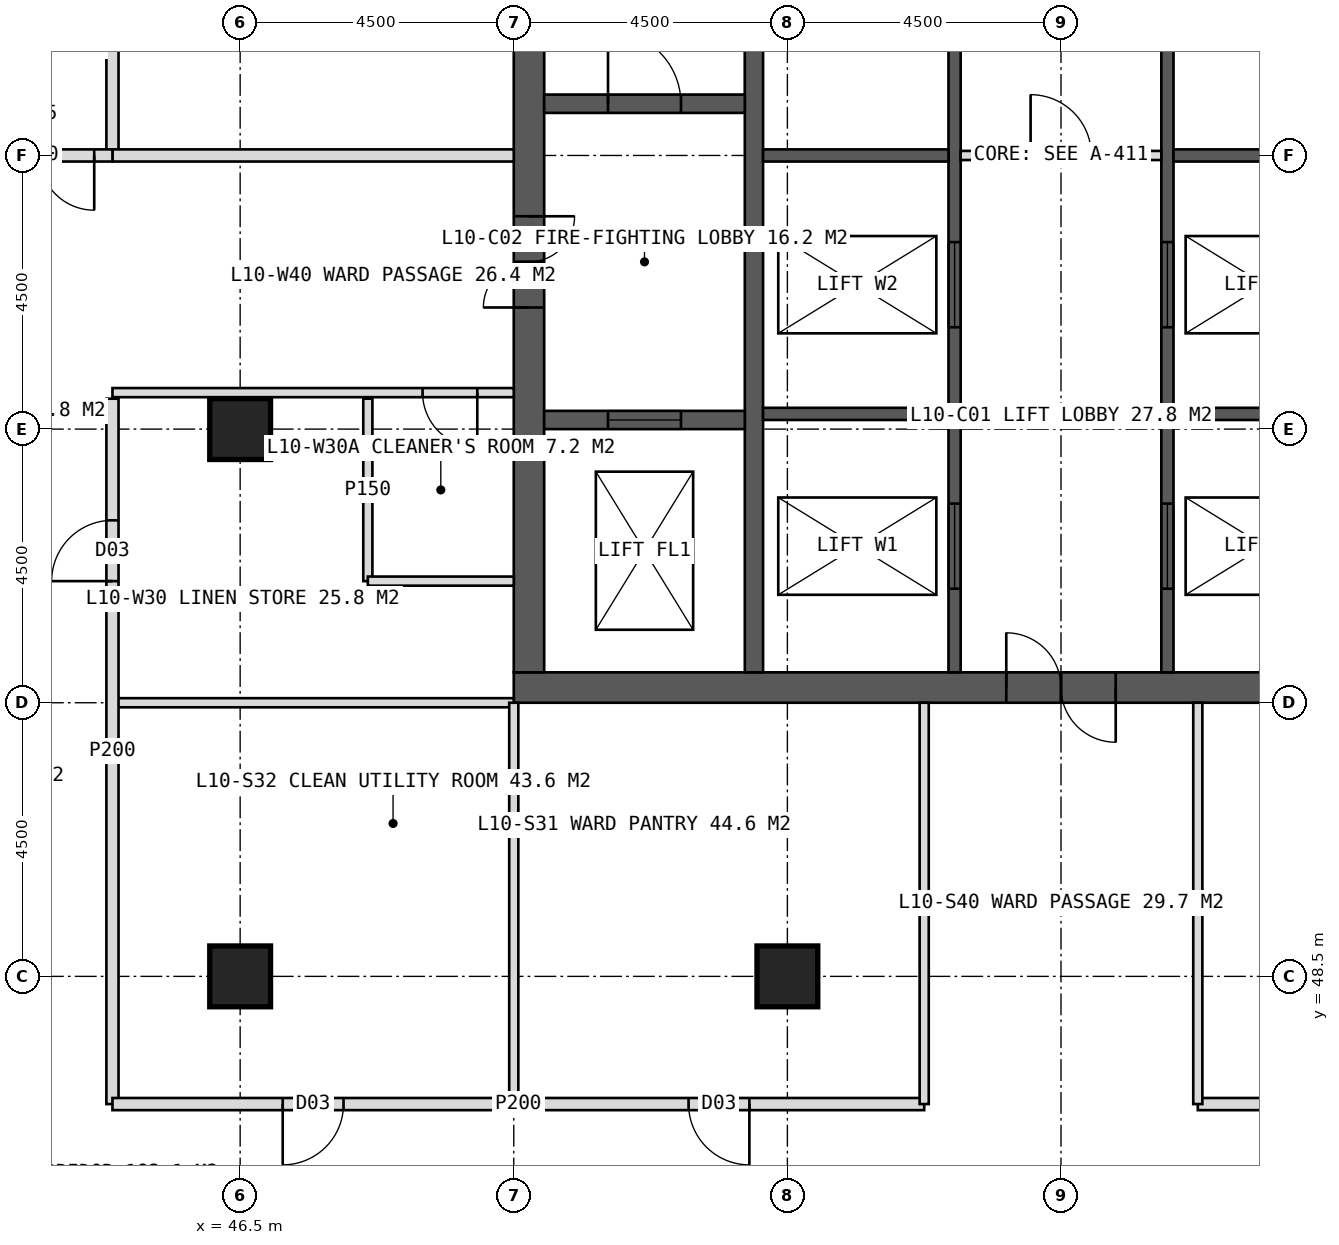
"""IFC4 building model, lengths in metres.
Left out: names, types, materials, properties, quantities, classifications, styles, units other than length and angle.
Written with IfcOpenShell. Run it as: python <this file> out.ifc"""

import sys

from ifc_helpers import new_model, si_unit, direction, frame, frame_2d, origin, origin_2d, place, context, subcontext, project, spatial, rectangle, hollow_rectangle, extrude, element, fill, save


model = new_model("IFC4")
c1 = context("Model", 3, precision=1e-05, world=origin(), true_north=direction((0.0, 1.0)))
c2 = subcontext(c1, "Body", "Model", "MODEL_VIEW")
j1 = project(units=[si_unit("LENGTHUNIT", "METRE"), si_unit("PLANEANGLEUNIT", "RADIAN")], contexts=[c1])
p1 = place(None, origin())
s1 = spatial("IfcSite", under=j1, at=p1, CompositionType="ELEMENT")
p2 = place(p1, origin())
s2 = spatial("IfcBuilding", under=s1, at=p2, CompositionType="ELEMENT")
p3 = place(p2, frame((0.0, 0.0, 47.0)))
s3 = spatial("IfcBuildingStorey", under=s2, at=p3, CompositionType="ELEMENT", Elevation=47.0)
p4 = place(p3, frame((51.0, 53.25, 0.0), z_axis=(0.0, 0.0, 1.0), x_axis=(1.0, 0.0, 0.0)))
e1 = element("IfcWall", 1, at=p4, inside=s3, PredefinedType="SHEAR", context=c2, shape_type="SweptSolid", body=[
    extrude(rectangle(XDim=18.0, YDim=0.5, at=frame_2d((9.0, 0.0))), origin(), (0.0, 0.0, 1.0), 4.0),
])
p5 = place(p4, frame((8.1, 0.0, 0.0)))
e2 = element("IfcOpeningElement", 2, at=p5, cuts=e1, PredefinedType="OPENING", context=c2, shape_type="SweptSolid", body=[
    extrude(rectangle(XDim=1.8, YDim=2.2, at=frame_2d((0.9, 1.1))), frame((0.0, 0.26, 0.0), z_axis=(0.0, -1.0, 0.0), x_axis=(1.0, 0.0, 0.0)), (0.0, 0.0, 1.0), 0.52),
])
p6 = place(p3, frame((51.25, 53.5, 0.0), z_axis=(0.0, 0.0, 1.0), x_axis=(0.0, 1.0, 0.0)))
e3 = element("IfcWall", 3, at=p6, inside=s3, PredefinedType="SHEAR", context=c2, shape_type="SweptSolid", body=[
    extrude(rectangle(XDim=17.0, YDim=0.5, at=frame_2d((8.5, 0.0))), origin(), (0.0, 0.0, 1.0), 4.0),
])
p7 = place(p6, frame((6.0, 0.0, 0.0)))
e4 = element("IfcOpeningElement", 4, at=p7, cuts=e3, PredefinedType="OPENING", context=c2, shape_type="SweptSolid", body=[
    extrude(rectangle(XDim=1.5, YDim=2.2, at=frame_2d((0.75, 1.1))), frame((0.0, 0.26, 0.0), z_axis=(0.0, -1.0, 0.0), x_axis=(1.0, 0.0, 0.0)), (0.0, 0.0, 1.0), 0.52),
])
p8 = place(p3, frame((54.95, 53.5, 0.0), z_axis=(0.0, 0.0, 1.0), x_axis=(0.0, 1.0, 0.0)))
e5 = element("IfcWall", 5, at=p8, inside=s3, PredefinedType="SHEAR", context=c2, shape_type="SweptSolid", body=[
    extrude(rectangle(XDim=17.0, YDim=0.3, at=frame_2d((8.5, 0.0))), origin(), (0.0, 0.0, 1.0), 4.0),
])
p9 = place(p3, frame((58.25, 53.5, 0.0), z_axis=(0.0, 0.0, 1.0), x_axis=(0.0, 1.0, 0.0)))
e6 = element("IfcWall", 6, at=p9, inside=s3, PredefinedType="SHEAR", context=c2, shape_type="SweptSolid", body=[
    extrude(rectangle(XDim=17.0, YDim=0.2, at=frame_2d((8.5, 0.0))), origin(), (0.0, 0.0, 1.0), 4.0),
])
p10 = place(p9, frame((1.375, 0.0, 0.0)))
e7 = element("IfcOpeningElement", 7, at=p10, cuts=e6, PredefinedType="OPENING", context=c2, shape_type="SweptSolid", body=[
    extrude(rectangle(XDim=1.4, YDim=2.2, at=frame_2d((0.7, 1.1))), frame((0.0, 0.11, 0.0), z_axis=(0.0, -1.0, 0.0), x_axis=(1.0, 0.0, 0.0)), (0.0, 0.0, 1.0), 0.22),
])
p11 = place(p9, frame((5.675, 0.0, 0.0)))
e8 = element("IfcOpeningElement", 8, at=p11, cuts=e6, PredefinedType="OPENING", context=c2, shape_type="SweptSolid", body=[
    extrude(rectangle(XDim=1.4, YDim=2.2, at=frame_2d((0.7, 1.1))), frame((0.0, 0.11, 0.0), z_axis=(0.0, -1.0, 0.0), x_axis=(1.0, 0.0, 0.0)), (0.0, 0.0, 1.0), 0.22),
])
p12 = place(p3, frame((61.75, 53.5, 0.0), z_axis=(0.0, 0.0, 1.0), x_axis=(0.0, 1.0, 0.0)))
e9 = element("IfcWall", 9, at=p12, inside=s3, PredefinedType="SHEAR", context=c2, shape_type="SweptSolid", body=[
    extrude(rectangle(XDim=17.0, YDim=0.2, at=frame_2d((8.5, 0.0))), origin(), (0.0, 0.0, 1.0), 4.0),
])
p13 = place(p12, frame((1.375, 0.0, 0.0)))
e10 = element("IfcOpeningElement", 10, at=p13, cuts=e9, PredefinedType="OPENING", context=c2, shape_type="SweptSolid", body=[
    extrude(rectangle(XDim=1.4, YDim=2.2, at=frame_2d((0.7, 1.1))), frame((0.0, 0.11, 0.0), z_axis=(0.0, -1.0, 0.0), x_axis=(1.0, 0.0, 0.0)), (0.0, 0.0, 1.0), 0.22),
])
p14 = place(p12, frame((5.675, 0.0, 0.0)))
e11 = element("IfcOpeningElement", 11, at=p14, cuts=e9, PredefinedType="OPENING", context=c2, shape_type="SweptSolid", body=[
    extrude(rectangle(XDim=1.4, YDim=2.2, at=frame_2d((0.7, 1.1))), frame((0.0, 0.11, 0.0), z_axis=(0.0, -1.0, 0.0), x_axis=(1.0, 0.0, 0.0)), (0.0, 0.0, 1.0), 0.22),
])
for number, where, z_axis, x_axis in (
    (12, (55.1, 57.75, 0.0), (0.0, 0.0, 1.0), (1.0, 0.0, 0.0)),
    (13, (61.85, 57.75, 0.0), (0.0, 0.0, 1.0), (1.0, 0.0, 0.0)),
    (14, (55.1, 62.0, 0.0), (0.0, 0.0, 1.0), (1.0, 0.0, 0.0)),
    (15, (61.85, 62.0, 0.0), (0.0, 0.0, 1.0), (1.0, 0.0, 0.0)),
):
    element("IfcWall", number, at=place(p3, frame(where, z_axis=z_axis, x_axis=x_axis)), inside=s3, PredefinedType="SHEAR", context=c2, shape_type="SweptSolid", body=[
        extrude(rectangle(XDim=3.05, YDim=0.2, at=frame_2d((1.525, 0.0))), origin(), (0.0, 0.0, 1.0), 4.0),
    ])
p15 = place(p3, frame((51.5, 62.85, 0.0), z_axis=(0.0, 0.0, 1.0), x_axis=(1.0, 0.0, 0.0)))
e16 = element("IfcWall", 16, at=p15, inside=s3, PredefinedType="SHEAR", context=c2, shape_type="SweptSolid", body=[
    extrude(rectangle(XDim=3.3, YDim=0.3, at=frame_2d((1.65, 0.0))), origin(), (0.0, 0.0, 1.0), 4.0),
])
p16 = place(p15, frame((1.05, 0.0, 0.0)))
e17 = element("IfcOpeningElement", 17, at=p16, cuts=e16, PredefinedType="OPENING", context=c2, shape_type="SweptSolid", body=[
    extrude(rectangle(XDim=1.2, YDim=2.1, at=frame_2d((0.6, 1.05))), frame((0.0, 0.16, 0.0), z_axis=(0.0, -1.0, 0.0), x_axis=(1.0, 0.0, 0.0)), (0.0, 0.0, 1.0), 0.32),
])
p17 = place(p3, frame((51.5, 57.65, 0.0), z_axis=(0.0, 0.0, 1.0), x_axis=(1.0, 0.0, 0.0)))
e18 = element("IfcWall", 18, at=p17, inside=s3, PredefinedType="SHEAR", context=c2, shape_type="SweptSolid", body=[
    extrude(rectangle(XDim=3.3, YDim=0.3, at=frame_2d((1.65, 0.0))), origin(), (0.0, 0.0, 1.0), 4.0),
])
p18 = place(p17, frame((1.05, 0.0, 0.0)))
e19 = element("IfcOpeningElement", 19, at=p18, cuts=e18, PredefinedType="OPENING", context=c2, shape_type="SweptSolid", body=[
    extrude(rectangle(XDim=1.2, YDim=2.2, at=frame_2d((0.6, 1.1))), frame((0.0, 0.16, 0.0), z_axis=(0.0, -1.0, 0.0), x_axis=(1.0, 0.0, 0.0)), (0.0, 0.0, 1.0), 0.32),
])
for number, where, z_axis, x_axis in (
    (20, (46.5, 48.5, 0.0), (0.0, 0.0, 1.0), (1.0, 0.0, 0.0)),
    (21, (55.5, 48.5, 0.0), (0.0, 0.0, 1.0), (1.0, 0.0, 0.0)),
    (22, (46.5, 57.5, 0.0), (0.0, 0.0, 1.0), (1.0, 0.0, 0.0)),
):
    element("IfcColumn", number, at=place(p3, frame(where, z_axis=z_axis, x_axis=x_axis)), inside=s3, PredefinedType="COLUMN", context=c2, shape_type="SweptSolid", body=[
        extrude(hollow_rectangle(XDim=1.0, YDim=1.0, WallThickness=0.1, at=origin_2d()), origin(), (0.0, 0.0, 1.0), 4.0),
    ])
p19 = place(p3, frame((51.0, 53.0, 0.0), z_axis=(0.0, 0.0, 1.0), x_axis=(-1.0, 0.0, 0.0)))
e23 = element("IfcWall", 23, at=p19, inside=s3, PredefinedType="PARTITIONING", context=c2, shape_type="SweptSolid", body=[
    extrude(rectangle(XDim=6.6, YDim=0.15, at=frame_2d((3.3, 0.0))), origin(), (0.0, 0.0, 1.0), 3.75),
])
p20 = place(p3, frame((44.4, 46.4, 0.0), z_axis=(0.0, 0.0, 1.0), x_axis=(0.0, 1.0, 0.0)))
e24 = element("IfcWall", 24, at=p20, inside=s3, PredefinedType="PARTITIONING", context=c2, shape_type="SweptSolid", body=[
    extrude(rectangle(XDim=11.6, YDim=0.2, at=frame_2d((5.8, 0.0))), origin(), (0.0, 0.0, 1.0), 3.75),
])
p21 = place(p20, frame((8.6, 0.0, 0.0)))
e25 = element("IfcOpeningElement", 25, at=p21, cuts=e24, PredefinedType="OPENING", context=c2, shape_type="SweptSolid", body=[
    extrude(rectangle(XDim=1.0, YDim=2.1, at=frame_2d((0.5, 1.05))), frame((0.0, 0.11, 0.0), z_axis=(0.0, -1.0, 0.0), x_axis=(1.0, 0.0, 0.0)), (0.0, 0.0, 1.0), 0.22),
])
p22 = place(p3, frame((44.4, 62.0, 0.0), z_axis=(0.0, 0.0, 1.0), x_axis=(0.0, 1.0, 0.0)))
e26 = element("IfcWall", 26, at=p22, inside=s3, PredefinedType="PARTITIONING", context=c2, shape_type="SweptSolid", body=[
    extrude(rectangle(XDim=15.6, YDim=0.2, at=frame_2d((7.8, 0.0))), origin(), (0.0, 0.0, 1.0), 3.75),
])
p23 = place(p22, frame((4.0, 0.0, 0.0)))
e27 = element("IfcOpeningElement", 27, at=p23, cuts=e26, PredefinedType="OPENING", context=c2, shape_type="SweptSolid", body=[
    extrude(rectangle(XDim=1.0, YDim=2.1, at=frame_2d((0.5, 1.05))), frame((0.0, 0.11, 0.0), z_axis=(0.0, -1.0, 0.0), x_axis=(1.0, 0.0, 0.0)), (0.0, 0.0, 1.0), 0.22),
])
p24 = place(p22, frame((11.8, 0.0, 0.0)))
e28 = element("IfcOpeningElement", 28, at=p24, cuts=e26, PredefinedType="OPENING", context=c2, shape_type="SweptSolid", body=[
    extrude(rectangle(XDim=1.0, YDim=2.1, at=frame_2d((0.5, 1.05))), frame((0.0, 0.11, 0.0), z_axis=(0.0, -1.0, 0.0), x_axis=(1.0, 0.0, 0.0)), (0.0, 0.0, 1.0), 0.22),
])
p25 = place(p3, frame((51.0, 58.1, 0.0), z_axis=(0.0, 0.0, 1.0), x_axis=(-1.0, 0.0, 0.0)))
e29 = element("IfcWall", 29, at=p25, inside=s3, PredefinedType="PARTITIONING", context=c2, shape_type="SweptSolid", body=[
    extrude(rectangle(XDim=6.6, YDim=0.15, at=frame_2d((3.3, 0.0))), origin(), (0.0, 0.0, 1.0), 3.75),
])
p26 = place(p25, frame((0.6, 0.0, 0.0)))
e30 = element("IfcOpeningElement", 30, at=p26, cuts=e29, PredefinedType="OPENING", context=c2, shape_type="SweptSolid", body=[
    extrude(rectangle(XDim=0.9, YDim=2.1, at=frame_2d((0.45, 1.05))), frame((0.0, 0.085, 0.0), z_axis=(0.0, -1.0, 0.0), x_axis=(1.0, 0.0, 0.0)), (0.0, 0.0, 1.0), 0.17),
])
p27 = place(p3, frame((51.0, 62.0, 0.0), z_axis=(0.0, 0.0, 1.0), x_axis=(-1.0, 0.0, 0.0)))
e31 = element("IfcWall", 31, at=p27, inside=s3, PredefinedType="SOLIDWALL", context=c2, shape_type="SweptSolid", body=[
    extrude(rectangle(XDim=6.6, YDim=0.2, at=frame_2d((3.3, 0.0))), origin(), (0.0, 0.0, 1.0), 2.75),
])
p28 = place(p3, frame((48.6, 55.0, 0.0), z_axis=(0.0, 0.0, 1.0), x_axis=(0.0, 1.0, 0.0)))
e32 = element("IfcWall", 32, at=p28, inside=s3, PredefinedType="PARTITIONING", context=c2, shape_type="SweptSolid", body=[
    extrude(rectangle(XDim=3.0, YDim=0.15, at=frame_2d((1.5, 0.0))), origin(), (0.0, 0.0, 1.0), 3.75),
])
p29 = place(p3, frame((51.0, 55.0, 0.0), z_axis=(0.0, 0.0, 1.0), x_axis=(-1.0, 0.0, 0.0)))
e33 = element("IfcWall", 33, at=p29, inside=s3, PredefinedType="PARTITIONING", context=c2, shape_type="SweptSolid", body=[
    extrude(rectangle(XDim=2.4, YDim=0.15, at=frame_2d((1.2, 0.0))), origin(), (0.0, 0.0, 1.0), 3.75),
])
p30 = place(p3, frame((75.6, 46.4, 0.0), z_axis=(0.0, 0.0, 1.0), x_axis=(-1.0, 0.0, 0.0)))
e34 = element("IfcWall", 34, at=p30, inside=s3, PredefinedType="PARTITIONING", context=c2, shape_type="SweptSolid", body=[
    extrude(rectangle(XDim=13.35, YDim=0.2, at=frame_2d((6.675, 0.0))), origin(), (0.0, 0.0, 1.0), 3.75),
])
p31 = place(p30, frame((9.475, 0.0, 0.0)))
e35 = element("IfcOpeningElement", 35, at=p31, cuts=e34, PredefinedType="OPENING", context=c2, shape_type="SweptSolid", body=[
    extrude(rectangle(XDim=1.0, YDim=2.1, at=frame_2d((0.5, 1.05))), frame((0.0, 0.11, 0.0), z_axis=(0.0, -1.0, 0.0), x_axis=(1.0, 0.0, 0.0)), (0.0, 0.0, 1.0), 0.22),
])
p32 = place(p3, frame((57.75, 46.4, 0.0), z_axis=(0.0, 0.0, 1.0), x_axis=(-1.0, 0.0, 0.0)))
e36 = element("IfcWall", 36, at=p32, inside=s3, PredefinedType="PARTITIONING", context=c2, shape_type="SweptSolid", body=[
    extrude(rectangle(XDim=13.35, YDim=0.2, at=frame_2d((6.675, 0.0))), origin(), (0.0, 0.0, 1.0), 3.75),
])
p33 = place(p32, frame((2.875, 0.0, 0.0)))
e37 = element("IfcOpeningElement", 37, at=p33, cuts=e36, PredefinedType="OPENING", context=c2, shape_type="SweptSolid", body=[
    extrude(rectangle(XDim=1.0, YDim=2.1, at=frame_2d((0.5, 1.05))), frame((0.0, 0.11, 0.0), z_axis=(0.0, -1.0, 0.0), x_axis=(1.0, 0.0, 0.0)), (0.0, 0.0, 1.0), 0.22),
])
p34 = place(p32, frame((9.55, 0.0, 0.0)))
e38 = element("IfcOpeningElement", 38, at=p34, cuts=e36, PredefinedType="OPENING", context=c2, shape_type="SweptSolid", body=[
    extrude(rectangle(XDim=1.0, YDim=2.1, at=frame_2d((0.5, 1.05))), frame((0.0, 0.11, 0.0), z_axis=(0.0, -1.0, 0.0), x_axis=(1.0, 0.0, 0.0)), (0.0, 0.0, 1.0), 0.22),
])
for number, where, z_axis, x_axis in (
    (39, (62.25, 53.0, 0.0), (0.0, 0.0, 1.0), (0.0, -1.0, 0.0)),
    (40, (57.75, 53.0, 0.0), (0.0, 0.0, 1.0), (0.0, -1.0, 0.0)),
    (41, (51.0, 53.0, 0.0), (0.0, 0.0, 1.0), (0.0, -1.0, 0.0)),
):
    element("IfcWall", number, at=place(p3, frame(where, z_axis=z_axis, x_axis=x_axis)), inside=s3, PredefinedType="PARTITIONING", context=c2, shape_type="SweptSolid", body=[
        extrude(rectangle(XDim=6.6, YDim=0.15, at=frame_2d((3.3, 0.0))), origin(), (0.0, 0.0, 1.0), 3.75),
    ])
p35 = place(p3, frame((44.4, 62.0, 0.0), z_axis=(0.0, 0.0, 1.0), x_axis=(-1.0, 0.0, 0.0)))
e42 = element("IfcWall", 42, at=p35, inside=s3, PredefinedType="SOLIDWALL", context=c2, shape_type="SweptSolid", body=[
    extrude(rectangle(XDim=2.7, YDim=0.2, at=frame_2d((1.35, 0.0))), origin(), (0.0, 0.0, 1.0), 2.75),
])
p36 = place(p35, frame((0.3, 0.0, 0.0)))
e43 = element("IfcOpeningElement", 43, at=p36, cuts=e42, PredefinedType="OPENING", context=c2, shape_type="SweptSolid", body=[
    extrude(rectangle(XDim=1.8, YDim=2.2, at=frame_2d((0.9, 1.1))), frame((0.0, 0.11, 0.0), z_axis=(0.0, -1.0, 0.0), x_axis=(1.0, 0.0, 0.0)), (0.0, 0.0, 1.0), 0.22),
])
p37 = place(p3, frame((58.35, 62.0, 0.0), z_axis=(0.0, 0.0, 1.0), x_axis=(1.0, 0.0, 0.0)))
e44 = element("IfcWall", 44, at=p37, inside=s3, PredefinedType="PARTITIONING", context=c2, shape_type="SweptSolid", body=[
    extrude(rectangle(XDim=3.3, YDim=0.15, at=frame_2d((1.65, 0.0))), origin(), (0.0, 0.0, 1.0), 3.75),
])
p38 = place(p37, frame((1.15, 0.0, 0.0)))
e45 = element("IfcOpeningElement", 45, at=p38, cuts=e44, PredefinedType="OPENING", context=c2, shape_type="SweptSolid", body=[
    extrude(rectangle(XDim=1.0, YDim=2.1, at=frame_2d((0.5, 1.05))), frame((0.0, 0.085, 0.0), z_axis=(0.0, -1.0, 0.0), x_axis=(1.0, 0.0, 0.0)), (0.0, 0.0, 1.0), 0.17),
])
p39 = place(p26, origin())
e46 = element("IfcDoor", 46, at=p39, inside=s3, OperationType="SINGLE_SWING_LEFT", PredefinedType="DOOR", context=c2, shape_type="SweptSolid", body=[
    extrude(rectangle(XDim=0.9, YDim=2.1, at=frame_2d((0.45, 1.05))), frame((0.0, 0.025, 0.0), z_axis=(0.0, -1.0, 0.0), x_axis=(1.0, 0.0, 0.0)), (0.0, 0.0, 1.0), 0.05),
])
fill(e30, e46)
p40 = place(p21, origin())
e47 = element("IfcDoor", 47, at=p40, inside=s3, OperationType="SINGLE_SWING_LEFT", PredefinedType="DOOR", context=c2, shape_type="SweptSolid", body=[
    extrude(rectangle(XDim=1.0, YDim=2.1, at=frame_2d((0.5, 1.05))), frame((0.0, 0.025, 0.0), z_axis=(0.0, -1.0, 0.0), x_axis=(1.0, 0.0, 0.0)), (0.0, 0.0, 1.0), 0.05),
])
fill(e25, e47)
p41 = place(p33, origin())
e48 = element("IfcDoor", 48, at=p41, inside=s3, OperationType="SINGLE_SWING_LEFT", PredefinedType="DOOR", context=c2, shape_type="SweptSolid", body=[
    extrude(rectangle(XDim=1.0, YDim=2.1, at=frame_2d((0.5, 1.05))), frame((0.0, 0.025, 0.0), z_axis=(0.0, -1.0, 0.0), x_axis=(1.0, 0.0, 0.0)), (0.0, 0.0, 1.0), 0.05),
])
fill(e37, e48)
p42 = place(p34, origin())
e49 = element("IfcDoor", 49, at=p42, inside=s3, OperationType="SINGLE_SWING_RIGHT", PredefinedType="DOOR", context=c2, shape_type="SweptSolid", body=[
    extrude(rectangle(XDim=1.0, YDim=2.1, at=frame_2d((0.5, 1.05))), frame((0.0, 0.025, 0.0), z_axis=(0.0, -1.0, 0.0), x_axis=(1.0, 0.0, 0.0)), (0.0, 0.0, 1.0), 0.05),
])
fill(e38, e49)
p43 = place(p36, origin())
e50 = element("IfcDoor", 50, at=p43, inside=s3, OperationType="DOUBLE_DOOR_DOUBLE_SWING", PredefinedType="DOOR", context=c2, shape_type="SweptSolid", body=[
    extrude(rectangle(XDim=1.8, YDim=2.2, at=frame_2d((0.9, 1.1))), frame((0.0, 0.025, 0.0), z_axis=(0.0, -1.0, 0.0), x_axis=(1.0, 0.0, 0.0)), (0.0, 0.0, 1.0), 0.05),
])
fill(e43, e50)
p44 = place(p5, origin())
e51 = element("IfcDoor", 51, at=p44, inside=s3, OperationType="DOUBLE_DOOR_SINGLE_SWING", PredefinedType="DOOR", context=c2, shape_type="SweptSolid", body=[
    extrude(rectangle(XDim=1.8, YDim=2.2, at=frame_2d((0.9, 1.1))), frame((0.0, 0.025, 0.0), z_axis=(0.0, -1.0, 0.0), x_axis=(1.0, 0.0, 0.0)), (0.0, 0.0, 1.0), 0.05),
])
fill(e2, e51)
p45 = place(p7, origin())
e52 = element("IfcDoor", 52, at=p45, inside=s3, OperationType="DOUBLE_DOOR_SINGLE_SWING", PredefinedType="DOOR", context=c2, shape_type="SweptSolid", body=[
    extrude(rectangle(XDim=1.5, YDim=2.2, at=frame_2d((0.75, 1.1))), frame((0.0, 0.025, 0.0), z_axis=(0.0, -1.0, 0.0), x_axis=(1.0, 0.0, 0.0)), (0.0, 0.0, 1.0), 0.05),
])
fill(e4, e52)
p46 = place(p16, origin())
e53 = element("IfcDoor", 53, at=p46, inside=s3, OperationType="SINGLE_SWING_LEFT", PredefinedType="DOOR", context=c2, shape_type="SweptSolid", body=[
    extrude(rectangle(XDim=1.2, YDim=2.1, at=frame_2d((0.6, 1.05))), frame((0.0, 0.025, 0.0), z_axis=(0.0, -1.0, 0.0), x_axis=(1.0, 0.0, 0.0)), (0.0, 0.0, 1.0), 0.05),
])
fill(e17, e53)
p47 = place(p18, origin())
e54 = element("IfcDoor", 54, at=p47, inside=s3, OperationType="SLIDING_TO_LEFT", PredefinedType="DOOR", context=c2, shape_type="SweptSolid", body=[
    extrude(rectangle(XDim=1.2, YDim=2.2, at=frame_2d((0.6, 1.1))), frame((0.0, 0.025, 0.0), z_axis=(0.0, -1.0, 0.0), x_axis=(1.0, 0.0, 0.0)), (0.0, 0.0, 1.0), 0.05),
])
fill(e19, e54)
p48 = place(p10, origin())
e55 = element("IfcDoor", 55, at=p48, inside=s3, OperationType="SLIDING_TO_LEFT", PredefinedType="DOOR", context=c2, shape_type="SweptSolid", body=[
    extrude(rectangle(XDim=1.4, YDim=2.2, at=frame_2d((0.7, 1.1))), frame((0.0, 0.025, 0.0), z_axis=(0.0, -1.0, 0.0), x_axis=(1.0, 0.0, 0.0)), (0.0, 0.0, 1.0), 0.05),
])
fill(e7, e55)
p49 = place(p13, origin())
e56 = element("IfcDoor", 56, at=p49, inside=s3, OperationType="SLIDING_TO_LEFT", PredefinedType="DOOR", context=c2, shape_type="SweptSolid", body=[
    extrude(rectangle(XDim=1.4, YDim=2.2, at=frame_2d((0.7, 1.1))), frame((0.0, 0.025, 0.0), z_axis=(0.0, -1.0, 0.0), x_axis=(1.0, 0.0, 0.0)), (0.0, 0.0, 1.0), 0.05),
])
fill(e10, e56)
p50 = place(p11, origin())
e57 = element("IfcDoor", 57, at=p50, inside=s3, OperationType="SLIDING_TO_LEFT", PredefinedType="DOOR", context=c2, shape_type="SweptSolid", body=[
    extrude(rectangle(XDim=1.4, YDim=2.2, at=frame_2d((0.7, 1.1))), frame((0.0, 0.025, 0.0), z_axis=(0.0, -1.0, 0.0), x_axis=(1.0, 0.0, 0.0)), (0.0, 0.0, 1.0), 0.05),
])
fill(e8, e57)
p51 = place(p14, origin())
e58 = element("IfcDoor", 58, at=p51, inside=s3, OperationType="SLIDING_TO_LEFT", PredefinedType="DOOR", context=c2, shape_type="SweptSolid", body=[
    extrude(rectangle(XDim=1.4, YDim=2.2, at=frame_2d((0.7, 1.1))), frame((0.0, 0.025, 0.0), z_axis=(0.0, -1.0, 0.0), x_axis=(1.0, 0.0, 0.0)), (0.0, 0.0, 1.0), 0.05),
])
fill(e11, e58)
p52 = place(p38, origin())
e59 = element("IfcDoor", 59, at=p52, inside=s3, OperationType="SINGLE_SWING_LEFT", PredefinedType="DOOR", context=c2, shape_type="SweptSolid", body=[
    extrude(rectangle(XDim=1.0, YDim=2.1, at=frame_2d((0.5, 1.05))), frame((0.0, 0.025, 0.0), z_axis=(0.0, -1.0, 0.0), x_axis=(1.0, 0.0, 0.0)), (0.0, 0.0, 1.0), 0.05),
])
fill(e45, e59)
save(model, sys.argv[1])
